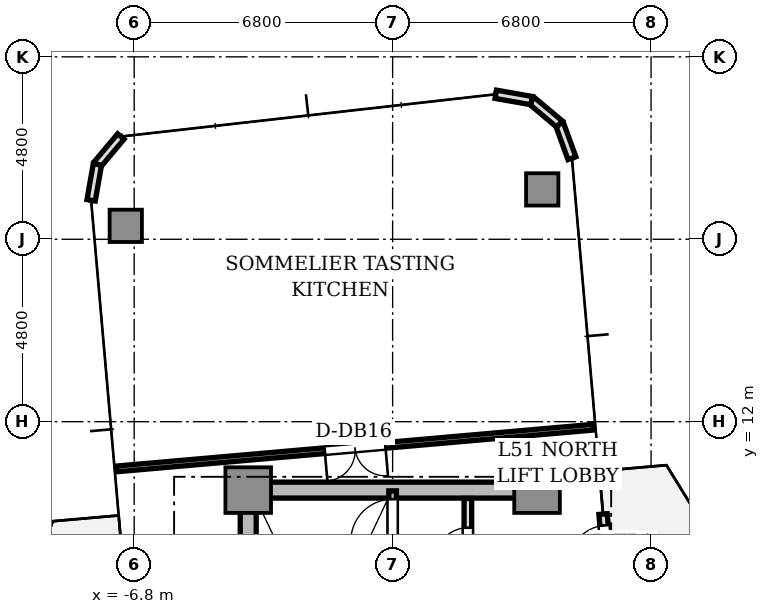
"""IFC4 building model, lengths in metres.
Left out: names, types, materials, properties, quantities, classifications, styles, units other than length and angle.
Written with IfcOpenShell. Run it as: python <this file> out.ifc"""

import sys

from ifc_helpers import new_model, si_unit, direction, frame, frame_2d, origin, origin_2d, place, context, subcontext, project, spatial, rectangle, extrude, source, transform, mapped, element, fill, save


model = new_model("IFC4")
c1 = context("Model", 3, precision=1e-05, world=origin(), true_north=direction((0.0, 1.0)))
c2 = subcontext(c1, "Body", "Model", "MODEL_VIEW")
j1 = project(units=[si_unit("LENGTHUNIT", "METRE"), si_unit("PLANEANGLEUNIT", "RADIAN")], contexts=[c1])
p1 = place(None, origin())
s1 = spatial("IfcSite", under=j1, at=p1, CompositionType="ELEMENT")
p2 = place(p1, origin())
s2 = spatial("IfcBuilding", under=s1, at=p2, CompositionType="ELEMENT")
p3 = place(p2, frame((0.0, 0.0, 185.25)))
s3 = spatial("IfcBuildingStorey", under=s2, at=p3, CompositionType="ELEMENT", Elevation=185.25)
p4 = place(p3, frame((-3.55, 10.2, 0.0), z_axis=(0.0, 0.0, 1.0), x_axis=(1.0, 0.0, 0.0)))
e1 = element("IfcWall", 1, at=p4, inside=s3, PredefinedType="SHEAR", context=c2, shape_type="SweptSolid", body=[
    extrude(rectangle(XDim=7.1, YDim=0.42, at=frame_2d((3.55, 0.0))), origin(), (0.0, 0.0, 1.0), 3.11),
])
p5 = place(p3, frame((-3.8, 2.85, 0.0), z_axis=(0.0, 0.0, 1.0), x_axis=(0.0, 1.0, 0.0)))
e2 = element("IfcWall", 2, at=p5, inside=s3, PredefinedType="SHEAR", context=c2, shape_type="SweptSolid", body=[
    extrude(rectangle(XDim=6.9, YDim=0.42, at=frame_2d((3.45, 0.0))), origin(), (0.0, 0.0, 1.0), 3.11),
])
m1 = source(origin(), c2, "Body", "SweptSolid", [
    extrude(rectangle(XDim=1.2, YDim=1.2, at=origin_2d()), origin(), (0.0, 0.0, 1.0), 3.11),
])
for number, where, z_axis, x_axis in (
    (3, (-3.8, 10.2, 0.0), (0.0, 0.0, 1.0), (1.0, 0.0, 0.0)),
    (4, (3.8, 10.2, 0.0), (0.0, 0.0, 1.0), (1.0, 0.0, 0.0)),
):
    element("IfcColumn", number, at=place(p3, frame(where, z_axis=z_axis, x_axis=x_axis)), inside=s3, PredefinedType="COLUMN", context=c2, shape_type="MappedRepresentation", body=[
        mapped(m1, transform((0.0, 0.0, 0.0), scale=1.0)),
    ])
m2 = source(origin(), c2, "Body", "SweptSolid", [
    extrude(rectangle(XDim=0.85, YDim=0.85, at=origin_2d()), origin(), (0.0, 0.0, 1.0), 3.11),
])
for number, where, z_axis, x_axis in (
    (5, (3.936, 18.112, 0.0), (0.0, 0.0, 1.0), (1.0, 0.0, 0.0)),
    (6, (-7.022, 17.153, 0.0), (0.0, 0.0, 1.0), (1.0, 0.0, 0.0)),
):
    element("IfcColumn", number, at=place(p3, frame(where, z_axis=z_axis, x_axis=x_axis)), inside=s3, PredefinedType="COLUMN", context=c2, shape_type="MappedRepresentation", body=[
        mapped(m2, transform((0.0, 0.0, 0.0), scale=1.0)),
    ])
p6 = place(p3, frame((5.772, 6.879, 0.0), z_axis=(0.0, 0.0, 1.0), x_axis=(-0.087168071984, 0.996193619346, 0.0)))
e7 = element("IfcWall", 7, at=p6, inside=s3, PredefinedType="STANDARD", context=c2, shape_type="SweptSolid", body=[
    extrude(rectangle(XDim=2.7, YDim=0.22, at=frame_2d((1.35, 0.0))), origin(), (0.0, 0.0, 1.0), 3.11),
])
p7 = place(p6, frame((1.4, 0.0, 0.0)))
e8 = element("IfcOpeningElement", 8, at=p7, cuts=e7, PredefinedType="OPENING", context=c2, shape_type="SweptSolid", body=[
    extrude(rectangle(XDim=1.0, YDim=2.2, at=frame_2d((0.5, 1.1))), frame((0.0, 0.12, 0.0), z_axis=(0.0, -1.0, 0.0), x_axis=(1.0, 0.0, 0.0)), (0.0, 0.0, 1.0), 0.24),
])
p8 = place(p3, frame((4.718, 18.933, 0.0), z_axis=(0.0, 0.0, 1.0), x_axis=(-0.34188635151, 0.939741306239, 0.0)))
e9 = element("IfcWall", 9, at=p8, inside=s3, PredefinedType="STANDARD", context=c2, shape_type="SweptSolid", body=[
    extrude(rectangle(XDim=0.958, YDim=0.22, at=frame_2d((0.479, 0.0))), origin(), (0.0, 0.0, 1.0), 3.11),
])
for number, where, z_axis, x_axis in (
    (10, (4.39, 19.833, 0.0), (0.0, 0.0, 1.0), (-0.766, 0.643, 0.0)),
    (11, (3.657, 20.449, 0.0), (0.0, 0.0, 1.0), (-0.985, 0.174, 0.0)),
):
    element("IfcWall", number, at=place(p3, frame(where, z_axis=z_axis, x_axis=x_axis)), inside=s3, PredefinedType="STANDARD", context=c2, shape_type="SweptSolid", body=[
        extrude(rectangle(XDim=0.958, YDim=0.22, at=frame_2d((0.479, 0.0))), origin(), (0.0, 0.0, 1.0), 3.11),
    ])
for number, where, z_axis, x_axis in (
    (12, (-7.152, 19.503, 0.0), (0.0, 0.0, 1.0), (-0.643, -0.766, 0.0)),
    (13, (-7.768, 18.769, 0.0), (0.0, 0.0, 1.0), (-0.174, -0.985, 0.0)),
):
    element("IfcWall", number, at=place(p3, frame(where, z_axis=z_axis, x_axis=x_axis)), inside=s3, PredefinedType="STANDARD", context=c2, shape_type="SweptSolid", body=[
        extrude(rectangle(XDim=0.958, YDim=0.22, at=frame_2d((0.479, 0.0))), origin(), (0.0, 0.0, 1.0), 3.11),
    ])
p9 = place(p3, frame((0.0, 2.5, 0.0), z_axis=(0.0, 0.0, 1.0), x_axis=(0.0, 1.0, 0.0)))
e14 = element("IfcWall", 14, at=p9, inside=s3, PredefinedType="SOLIDWALL", context=c2, shape_type="SweptSolid", body=[
    extrude(rectangle(XDim=7.68, YDim=0.2, at=frame_2d((3.84, 0.0))), origin(), (0.0, 0.0, 1.0), 3.11),
])
p10 = place(p9, frame((6.36, 0.0, 0.0)))
e15 = element("IfcOpeningElement", 15, at=p10, cuts=e14, PredefinedType="OPENING", context=c2, shape_type="SweptSolid", body=[
    extrude(rectangle(XDim=1.1, YDim=2.15, at=frame_2d((0.55, 1.075))), frame((0.0, 0.11, 0.0), z_axis=(0.0, -1.0, 0.0), x_axis=(1.0, 0.0, 0.0)), (0.0, 0.0, 1.0), 0.22),
])
p11 = place(p3, frame((1.98, 5.32, 0.0), z_axis=(0.0, 0.0, 1.0), x_axis=(0.0, 1.0, 0.0)))
e16 = element("IfcWall", 16, at=p11, inside=s3, PredefinedType="SOLIDWALL", context=c2, shape_type="SweptSolid", body=[
    extrude(rectangle(XDim=4.66, YDim=0.2, at=frame_2d((2.33, 0.0))), origin(), (0.0, 0.0, 1.0), 2.66),
])
p12 = place(p11, frame((3.04, 0.0, 0.0)))
e17 = element("IfcOpeningElement", 17, at=p12, cuts=e16, PredefinedType="OPENING", context=c2, shape_type="SweptSolid", body=[
    extrude(rectangle(XDim=0.85, YDim=2.1, at=frame_2d((0.425, 1.05))), frame((0.0, 0.11, 0.0), z_axis=(0.0, -1.0, 0.0), x_axis=(1.0, 0.0, 0.0)), (0.0, 0.0, 1.0), 0.22),
])
p13 = place(p3, frame((5.287, 11.856, 0.0), z_axis=(0.0, 0.0, 1.0), x_axis=(-0.996194790044, -0.087154691724, 0.0)))
e18 = element("IfcWall", 18, at=p13, inside=s3, PredefinedType="PARTITIONING", context=c2, shape_type="SweptSolid", body=[
    extrude(rectangle(XDim=12.6, YDim=0.15, at=frame_2d((6.3, 0.0))), origin(), (0.0, 0.0, 1.0), 2.66),
])
p14 = place(p13, frame((5.5, 0.0, 0.0)))
e19 = element("IfcOpeningElement", 19, at=p14, cuts=e18, PredefinedType="OPENING", context=c2, shape_type="SweptSolid", body=[
    extrude(rectangle(XDim=1.6, YDim=2.25, at=frame_2d((0.8, 1.125))), frame((0.0, 0.085, 0.0), z_axis=(0.0, -1.0, 0.0), x_axis=(1.0, 0.0, 0.0)), (0.0, 0.0, 1.0), 0.17),
])
m3 = source(origin(), c2, "Body", "SweptSolid", [
    extrude(rectangle(XDim=1.0, YDim=0.05, at=origin_2d()), origin(), (0.0, 0.0, 1.0), 2.2),
])
p15 = place(p7, frame((0.5, 0.0, 0.0)))
e20 = element("IfcDoor", 20, at=p15, inside=s3, OperationType="SINGLE_SWING_LEFT", PredefinedType="DOOR", context=c2, shape_type="MappedRepresentation", body=[
    mapped(m3, transform((0.0, 0.0, 0.0), scale=1.0)),
])
fill(e8, e20)
m4 = source(origin(), c2, "Body", "SweptSolid", [
    extrude(rectangle(XDim=1.1, YDim=0.05, at=origin_2d()), origin(), (0.0, 0.0, 1.0), 2.15),
])
p16 = place(p10, frame((0.55, 0.0, 0.0)))
e21 = element("IfcDoor", 21, at=p16, inside=s3, OperationType="SINGLE_SWING_LEFT", PredefinedType="DOOR", context=c2, shape_type="MappedRepresentation", body=[
    mapped(m4, transform((0.0, 0.0, 0.0), scale=1.0)),
])
fill(e15, e21)
m5 = source(origin(), c2, "Body", "SweptSolid", [
    extrude(rectangle(XDim=0.85, YDim=0.05, at=origin_2d()), origin(), (0.0, 0.0, 1.0), 2.1),
])
p17 = place(p12, frame((0.425, 0.0, 0.0)))
e22 = element("IfcDoor", 22, at=p17, inside=s3, OperationType="SINGLE_SWING_LEFT", PredefinedType="DOOR", context=c2, shape_type="MappedRepresentation", body=[
    mapped(m5, transform((0.0, 0.0, 0.0), scale=1.0)),
])
fill(e17, e22)
m6 = source(origin(), c2, "Body", "SweptSolid", [
    extrude(rectangle(XDim=1.6, YDim=0.05, at=origin_2d()), origin(), (0.0, 0.0, 1.0), 2.25),
])
p18 = place(p14, frame((0.8, 0.0, 0.0)))
e23 = element("IfcDoor", 23, at=p18, inside=s3, OperationType="DOUBLE_DOOR_SINGLE_SWING", PredefinedType="DOOR", context=c2, shape_type="MappedRepresentation", body=[
    mapped(m6, transform((0.0, 0.0, 0.0), scale=1.0)),
])
fill(e19, e23)
save(model, sys.argv[1])
